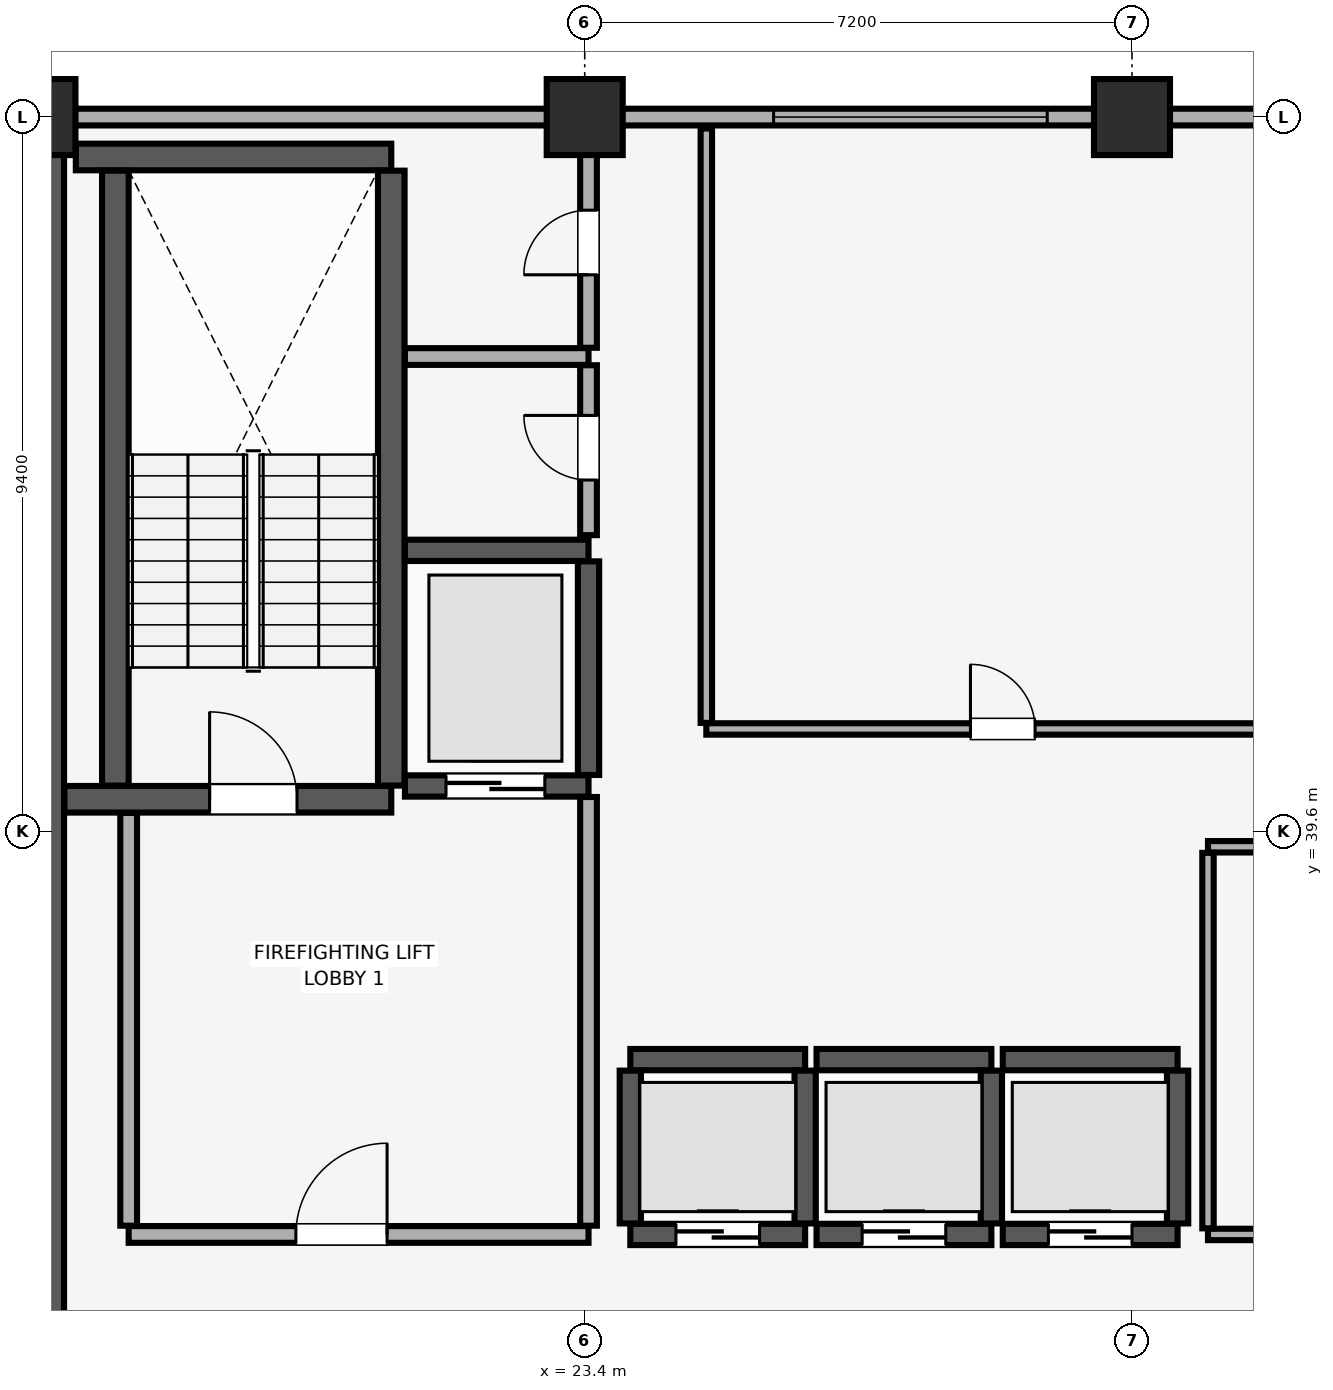
"""IFC4 building model, lengths in metres.
Left out: names, types, materials, properties, quantities, classifications, styles, units other than length and angle.
Written with IfcOpenShell. Run it as: python <this file> out.ifc"""

import sys

from ifc_helpers import new_model, si_unit, direction, frame, frame_2d, origin, origin_2d, place, context, subcontext, project, spatial, rectangle, extrude, element, fill, save


model = new_model("IFC4")
c1 = context("Model", 3, precision=1e-05, world=origin(), true_north=direction((0.0, 1.0)))
c2 = subcontext(c1, "Body", "Model", "MODEL_VIEW")
j1 = project(units=[si_unit("LENGTHUNIT", "METRE"), si_unit("PLANEANGLEUNIT", "RADIAN")], contexts=[c1])
p1 = place(None, origin())
s1 = spatial("IfcSite", under=j1, at=p1, CompositionType="ELEMENT")
p2 = place(p1, origin())
s2 = spatial("IfcBuilding", under=s1, at=p2, CompositionType="ELEMENT")
p3 = place(p2, frame((0.0, 0.0, 229.15)))
s3 = spatial("IfcBuildingStorey", under=s2, at=p3, CompositionType="ELEMENT", Elevation=229.15)
for number, where, z_axis, x_axis in (
    (1, (16.2, 49.0, 0.0), (0.0, 0.0, 1.0), (1.0, 0.0, 0.0)),
    (2, (23.4, 49.0, 0.0), (0.0, 0.0, 1.0), (1.0, 0.0, 0.0)),
    (3, (30.6, 49.0, 0.0), (0.0, 0.0, 1.0), (1.0, 0.0, 0.0)),
):
    element("IfcColumn", number, at=place(p3, frame(where, z_axis=z_axis, x_axis=x_axis)), inside=s3, PredefinedType="COLUMN", context=c2, shape_type="SweptSolid", body=[
        extrude(rectangle(XDim=1.0, YDim=1.0, at=origin_2d()), origin(), (0.0, 0.0, 1.0), 3.71),
    ])
p4 = place(p3, frame((74.2, 49.0, 0.0), z_axis=(0.0, 0.0, 1.0), x_axis=(-1.0, 0.0, 0.0)))
e4 = element("IfcWall", 4, at=p4, inside=s3, PredefinedType="SOLIDWALL", context=c2, shape_type="SweptSolid", body=[
    extrude(rectangle(XDim=64.4, YDim=0.22, at=frame_2d((32.2, 0.0))), origin(), (0.0, 0.0, 1.0), 2.91),
])
p5 = place(p4, frame((59.815, 0.0, 0.85)))
e5 = element("IfcOpeningElement", 5, at=p5, cuts=e4, PredefinedType="OPENING", context=c2, shape_type="SweptSolid", body=[
    extrude(rectangle(XDim=3.0, YDim=1.5, at=frame_2d((1.5, 0.75))), frame((0.0, 0.12, 0.0), z_axis=(0.0, -1.0, 0.0), x_axis=(1.0, 0.0, 0.0)), (0.0, 0.0, 1.0), 0.24),
])
p6 = place(p4, frame((1.585, 0.0, 0.85)))
e6 = element("IfcOpeningElement", 6, at=p6, cuts=e4, PredefinedType="OPENING", context=c2, shape_type="SweptSolid", body=[
    extrude(rectangle(XDim=3.0, YDim=1.5, at=frame_2d((1.5, 0.75))), frame((0.0, 0.12, 0.0), z_axis=(0.0, -1.0, 0.0), x_axis=(1.0, 0.0, 0.0)), (0.0, 0.0, 1.0), 0.24),
])
p7 = place(p4, frame((44.715, 0.0, 0.9)))
e7 = element("IfcOpeningElement", 7, at=p7, cuts=e4, PredefinedType="OPENING", context=c2, shape_type="SweptSolid", body=[
    extrude(rectangle(XDim=3.6, YDim=1.5, at=frame_2d((1.8, 0.75))), frame((0.0, 0.12, 0.0), z_axis=(0.0, -1.0, 0.0), x_axis=(1.0, 0.0, 0.0)), (0.0, 0.0, 1.0), 0.24),
])
p8 = place(p4, frame((38.5, 0.0, 0.9)))
e8 = element("IfcOpeningElement", 8, at=p8, cuts=e4, PredefinedType="OPENING", context=c2, shape_type="SweptSolid", body=[
    extrude(rectangle(XDim=2.4, YDim=1.5, at=frame_2d((1.2, 0.75))), frame((0.0, 0.12, 0.0), z_axis=(0.0, -1.0, 0.0), x_axis=(1.0, 0.0, 0.0)), (0.0, 0.0, 1.0), 0.24),
])
p9 = place(p4, frame((21.75, 0.0, 0.9)))
e9 = element("IfcOpeningElement", 9, at=p9, cuts=e4, PredefinedType="OPENING", context=c2, shape_type="SweptSolid", body=[
    extrude(rectangle(XDim=3.0, YDim=1.5, at=frame_2d((1.5, 0.75))), frame((0.0, 0.12, 0.0), z_axis=(0.0, -1.0, 0.0), x_axis=(1.0, 0.0, 0.0)), (0.0, 0.0, 1.0), 0.24),
])
p10 = place(p4, frame((17.435, 0.0, 0.9)))
e10 = element("IfcOpeningElement", 10, at=p10, cuts=e4, PredefinedType="OPENING", context=c2, shape_type="SweptSolid", body=[
    extrude(rectangle(XDim=2.4, YDim=1.5, at=frame_2d((1.2, 0.75))), frame((0.0, 0.12, 0.0), z_axis=(0.0, -1.0, 0.0), x_axis=(1.0, 0.0, 0.0)), (0.0, 0.0, 1.0), 0.24),
])
p11 = place(p3, frame((16.2, 29.4, 0.0), z_axis=(0.0, 0.0, 1.0), x_axis=(0.0, 1.0, 0.0)))
e11 = element("IfcWall", 11, at=p11, inside=s3, PredefinedType="SHEAR", context=c2, shape_type="SweptSolid", body=[
    extrude(rectangle(XDim=19.2, YDim=0.7, at=frame_2d((9.6, 0.0))), origin(), (0.0, 0.0, 1.0), 3.71),
])
p12 = place(p3, frame((16.555, 40.025, 0.0), z_axis=(0.0, 0.0, 1.0), x_axis=(1.0, 0.0, 0.0)))
e12 = element("IfcWall", 12, at=p12, inside=s3, PredefinedType="SHEAR", context=c2, shape_type="SweptSolid", body=[
    extrude(rectangle(XDim=4.3, YDim=0.35, at=frame_2d((2.15, 0.0))), origin(), (0.0, 0.0, 1.0), 3.71),
])
p13 = place(p12, frame((1.91, 0.0, 0.0)))
e13 = element("IfcOpeningElement", 13, at=p13, cuts=e12, PredefinedType="OPENING", context=c2, shape_type="SweptSolid", body=[
    extrude(rectangle(XDim=1.15, YDim=2.15, at=frame_2d((0.575, 1.075))), frame((0.0, 0.185, 0.0), z_axis=(0.0, -1.0, 0.0), x_axis=(1.0, 0.0, 0.0)), (0.0, 0.0, 1.0), 0.37),
])
p14 = place(p3, frame((16.705, 48.475, 0.0), z_axis=(0.0, 0.0, 1.0), x_axis=(1.0, 0.0, 0.0)))
e14 = element("IfcWall", 14, at=p14, inside=s3, PredefinedType="SHEAR", context=c2, shape_type="SweptSolid", body=[
    extrude(rectangle(XDim=4.15, YDim=0.35, at=frame_2d((2.075, 0.0))), origin(), (0.0, 0.0, 1.0), 3.71),
])
for number, where, z_axis, x_axis in (
    (15, (17.225, 40.205, 0.0), (0.0, 0.0, 1.0), (0.0, 1.0, 0.0)),
    (16, (20.855, 40.205, 0.0), (0.0, 0.0, 1.0), (0.0, 1.0, 0.0)),
):
    element("IfcWall", number, at=place(p3, frame(where, z_axis=z_axis, x_axis=x_axis)), inside=s3, PredefinedType="SHEAR", context=c2, shape_type="SweptSolid", body=[
        extrude(rectangle(XDim=8.09, YDim=0.35, at=frame_2d((4.045, 0.0))), origin(), (0.0, 0.0, 1.0), 3.71),
    ])
p15 = place(p3, frame((24.0, 34.3, 0.0), z_axis=(0.0, 0.0, 1.0), x_axis=(1.0, 0.0, 0.0)))
e17 = element("IfcWall", 17, at=p15, inside=s3, PredefinedType="SHEAR", context=c2, shape_type="SweptSolid", body=[
    extrude(rectangle(XDim=2.3, YDim=0.28, at=frame_2d((1.15, 0.0))), origin(), (0.0, 0.0, 1.0), 3.71),
])
p16 = place(p15, frame((0.6, 0.0, 0.0)))
e18 = element("IfcOpeningElement", 18, at=p16, cuts=e17, PredefinedType="OPENING", context=c2, shape_type="SweptSolid", body=[
    extrude(rectangle(XDim=1.1, YDim=2.2, at=frame_2d((0.55, 1.1))), frame((0.0, 0.15, 0.0), z_axis=(0.0, -1.0, 0.0), x_axis=(1.0, 0.0, 0.0)), (0.0, 0.0, 1.0), 0.3),
])
p17 = place(p3, frame((24.0, 36.6, 0.0), z_axis=(0.0, 0.0, 1.0), x_axis=(1.0, 0.0, 0.0)))
e19 = element("IfcWall", 19, at=p17, inside=s3, PredefinedType="SHEAR", context=c2, shape_type="SweptSolid", body=[
    extrude(rectangle(XDim=2.3, YDim=0.28, at=frame_2d((1.15, 0.0))), origin(), (0.0, 0.0, 1.0), 3.71),
])
for number, where, z_axis, x_axis in (
    (20, (24.0, 34.445, 0.0), (0.0, 0.0, 1.0), (0.0, 1.0, 0.0)),
    (21, (26.3, 34.445, 0.0), (0.0, 0.0, 1.0), (0.0, 1.0, 0.0)),
):
    element("IfcWall", number, at=place(p3, frame(where, z_axis=z_axis, x_axis=x_axis)), inside=s3, PredefinedType="SHEAR", context=c2, shape_type="SweptSolid", body=[
        extrude(rectangle(XDim=2.01, YDim=0.28, at=frame_2d((1.005, 0.0))), origin(), (0.0, 0.0, 1.0), 3.71),
    ])
p18 = place(p3, frame((26.45, 34.3, 0.0), z_axis=(0.0, 0.0, 1.0), x_axis=(1.0, 0.0, 0.0)))
e22 = element("IfcWall", 22, at=p18, inside=s3, PredefinedType="SHEAR", context=c2, shape_type="SweptSolid", body=[
    extrude(rectangle(XDim=2.3, YDim=0.28, at=frame_2d((1.15, 0.0))), origin(), (0.0, 0.0, 1.0), 3.71),
])
p19 = place(p18, frame((0.6, 0.0, 0.0)))
e23 = element("IfcOpeningElement", 23, at=p19, cuts=e22, PredefinedType="OPENING", context=c2, shape_type="SweptSolid", body=[
    extrude(rectangle(XDim=1.1, YDim=2.2, at=frame_2d((0.55, 1.1))), frame((0.0, 0.15, 0.0), z_axis=(0.0, -1.0, 0.0), x_axis=(1.0, 0.0, 0.0)), (0.0, 0.0, 1.0), 0.3),
])
p20 = place(p3, frame((26.45, 36.6, 0.0), z_axis=(0.0, 0.0, 1.0), x_axis=(1.0, 0.0, 0.0)))
e24 = element("IfcWall", 24, at=p20, inside=s3, PredefinedType="SHEAR", context=c2, shape_type="SweptSolid", body=[
    extrude(rectangle(XDim=2.3, YDim=0.28, at=frame_2d((1.15, 0.0))), origin(), (0.0, 0.0, 1.0), 3.71),
])
p21 = place(p3, frame((28.75, 34.445, 0.0), z_axis=(0.0, 0.0, 1.0), x_axis=(0.0, 1.0, 0.0)))
e25 = element("IfcWall", 25, at=p21, inside=s3, PredefinedType="SHEAR", context=c2, shape_type="SweptSolid", body=[
    extrude(rectangle(XDim=2.01, YDim=0.28, at=frame_2d((1.005, 0.0))), origin(), (0.0, 0.0, 1.0), 3.71),
])
p22 = place(p3, frame((28.9, 34.3, 0.0), z_axis=(0.0, 0.0, 1.0), x_axis=(1.0, 0.0, 0.0)))
e26 = element("IfcWall", 26, at=p22, inside=s3, PredefinedType="SHEAR", context=c2, shape_type="SweptSolid", body=[
    extrude(rectangle(XDim=2.3, YDim=0.28, at=frame_2d((1.15, 0.0))), origin(), (0.0, 0.0, 1.0), 3.71),
])
p23 = place(p22, frame((0.6, 0.0, 0.0)))
e27 = element("IfcOpeningElement", 27, at=p23, cuts=e26, PredefinedType="OPENING", context=c2, shape_type="SweptSolid", body=[
    extrude(rectangle(XDim=1.1, YDim=2.2, at=frame_2d((0.55, 1.1))), frame((0.0, 0.15, 0.0), z_axis=(0.0, -1.0, 0.0), x_axis=(1.0, 0.0, 0.0)), (0.0, 0.0, 1.0), 0.3),
])
p24 = place(p3, frame((28.9, 36.6, 0.0), z_axis=(0.0, 0.0, 1.0), x_axis=(1.0, 0.0, 0.0)))
e28 = element("IfcWall", 28, at=p24, inside=s3, PredefinedType="SHEAR", context=c2, shape_type="SweptSolid", body=[
    extrude(rectangle(XDim=2.3, YDim=0.28, at=frame_2d((1.15, 0.0))), origin(), (0.0, 0.0, 1.0), 3.71),
])
p25 = place(p3, frame((31.2, 34.445, 0.0), z_axis=(0.0, 0.0, 1.0), x_axis=(0.0, 1.0, 0.0)))
e29 = element("IfcWall", 29, at=p25, inside=s3, PredefinedType="SHEAR", context=c2, shape_type="SweptSolid", body=[
    extrude(rectangle(XDim=2.01, YDim=0.28, at=frame_2d((1.005, 0.0))), origin(), (0.0, 0.0, 1.0), 3.71),
])
p26 = place(p3, frame((21.035, 40.2, 0.0), z_axis=(0.0, 0.0, 1.0), x_axis=(1.0, 0.0, 0.0)))
e30 = element("IfcWall", 30, at=p26, inside=s3, PredefinedType="SHEAR", context=c2, shape_type="SweptSolid", body=[
    extrude(rectangle(XDim=2.415, YDim=0.28, at=frame_2d((1.208, 0.0))), origin(), (0.0, 0.0, 1.0), 3.71),
])
p27 = place(p26, frame((0.54, 0.0, 0.0)))
e31 = element("IfcOpeningElement", 31, at=p27, cuts=e30, PredefinedType="OPENING", context=c2, shape_type="SweptSolid", body=[
    extrude(rectangle(XDim=1.3, YDim=2.3, at=frame_2d((0.65, 1.15))), frame((0.0, 0.15, 0.0), z_axis=(0.0, -1.0, 0.0), x_axis=(1.0, 0.0, 0.0)), (0.0, 0.0, 1.0), 0.3),
])
p28 = place(p3, frame((21.035, 43.3, 0.0), z_axis=(0.0, 0.0, 1.0), x_axis=(1.0, 0.0, 0.0)))
e32 = element("IfcWall", 32, at=p28, inside=s3, PredefinedType="SHEAR", context=c2, shape_type="SweptSolid", body=[
    extrude(rectangle(XDim=2.415, YDim=0.28, at=frame_2d((1.208, 0.0))), origin(), (0.0, 0.0, 1.0), 3.71),
])
p29 = place(p3, frame((23.45, 40.345, 0.0), z_axis=(0.0, 0.0, 1.0), x_axis=(0.0, 1.0, 0.0)))
e33 = element("IfcWall", 33, at=p29, inside=s3, PredefinedType="SHEAR", context=c2, shape_type="SweptSolid", body=[
    extrude(rectangle(XDim=2.81, YDim=0.28, at=frame_2d((1.405, 0.0))), origin(), (0.0, 0.0, 1.0), 3.71),
])
p30 = place(p3, frame((17.4, 34.3, 0.0), z_axis=(0.0, 0.0, 1.0), x_axis=(1.0, 0.0, 0.0)))
e34 = element("IfcWall", 34, at=p30, inside=s3, PredefinedType="PARTITIONING", context=c2, shape_type="SweptSolid", body=[
    extrude(rectangle(XDim=6.05, YDim=0.22, at=frame_2d((3.025, 0.0))), origin(), (0.0, 0.0, 1.0), 3.71),
])
p31 = place(p30, frame((2.2, 0.0, 0.0)))
e35 = element("IfcOpeningElement", 35, at=p31, cuts=e34, PredefinedType="OPENING", context=c2, shape_type="SweptSolid", body=[
    extrude(rectangle(XDim=1.2, YDim=2.15, at=frame_2d((0.6, 1.075))), frame((0.0, 0.12, 0.0), z_axis=(0.0, -1.0, 0.0), x_axis=(1.0, 0.0, 0.0)), (0.0, 0.0, 1.0), 0.24),
])
p32 = place(p3, frame((17.4, 34.415, 0.0), z_axis=(0.0, 0.0, 1.0), x_axis=(0.0, 1.0, 0.0)))
e36 = element("IfcWall", 36, at=p32, inside=s3, PredefinedType="PARTITIONING", context=c2, shape_type="SweptSolid", body=[
    extrude(rectangle(XDim=5.43, YDim=0.22, at=frame_2d((2.715, 0.0))), origin(), (0.0, 0.0, 1.0), 3.71),
])
p33 = place(p3, frame((23.45, 34.415, 0.0), z_axis=(0.0, 0.0, 1.0), x_axis=(0.0, 1.0, 0.0)))
e37 = element("IfcWall", 37, at=p33, inside=s3, PredefinedType="PARTITIONING", context=c2, shape_type="SweptSolid", body=[
    extrude(rectangle(XDim=5.64, YDim=0.22, at=frame_2d((2.82, 0.0))), origin(), (0.0, 0.0, 1.0), 3.71),
])
p34 = place(p3, frame((21.035, 45.85, 0.0), z_axis=(0.0, 0.0, 1.0), x_axis=(1.0, 0.0, 0.0)))
e38 = element("IfcWall", 38, at=p34, inside=s3, PredefinedType="PARTITIONING", context=c2, shape_type="SweptSolid", body=[
    extrude(rectangle(XDim=2.415, YDim=0.22, at=frame_2d((1.208, 0.0))), origin(), (0.0, 0.0, 1.0), 3.71),
])
p35 = place(p3, frame((23.45, 43.5, 0.0), z_axis=(0.0, 0.0, 1.0), x_axis=(0.0, 1.0, 0.0)))
e39 = element("IfcWall", 39, at=p35, inside=s3, PredefinedType="PARTITIONING", context=c2, shape_type="SweptSolid", body=[
    extrude(rectangle(XDim=2.235, YDim=0.22, at=frame_2d((1.118, 0.0))), origin(), (0.0, 0.0, 1.0), 3.71),
])
p36 = place(p35, frame((0.725, 0.0, 0.0)))
e40 = element("IfcOpeningElement", 40, at=p36, cuts=e39, PredefinedType="OPENING", context=c2, shape_type="SweptSolid", body=[
    extrude(rectangle(XDim=0.85, YDim=2.1, at=frame_2d((0.425, 1.05))), frame((0.0, 0.12, 0.0), z_axis=(0.0, -1.0, 0.0), x_axis=(1.0, 0.0, 0.0)), (0.0, 0.0, 1.0), 0.24),
])
p37 = place(p3, frame((23.45, 45.965, 0.0), z_axis=(0.0, 0.0, 1.0), x_axis=(0.0, 1.0, 0.0)))
e41 = element("IfcWall", 41, at=p37, inside=s3, PredefinedType="PARTITIONING", context=c2, shape_type="SweptSolid", body=[
    extrude(rectangle(XDim=2.885, YDim=0.22, at=frame_2d((1.442, 0.0))), origin(), (0.0, 0.0, 1.0), 3.71),
])
p38 = place(p37, frame((0.96, 0.0, 0.0)))
e42 = element("IfcOpeningElement", 42, at=p38, cuts=e41, PredefinedType="OPENING", context=c2, shape_type="SweptSolid", body=[
    extrude(rectangle(XDim=0.85, YDim=2.1, at=frame_2d((0.425, 1.05))), frame((0.0, 0.12, 0.0), z_axis=(0.0, -1.0, 0.0), x_axis=(1.0, 0.0, 0.0)), (0.0, 0.0, 1.0), 0.24),
])
p39 = place(p3, frame((31.6, 34.3, 0.0), z_axis=(0.0, 0.0, 1.0), x_axis=(1.0, 0.0, 0.0)))
e43 = element("IfcWall", 43, at=p39, inside=s3, PredefinedType="PARTITIONING", context=c2, shape_type="SweptSolid", body=[
    extrude(rectangle(XDim=5.2, YDim=0.15, at=frame_2d((2.6, 0.0))), origin(), (0.0, 0.0, 1.0), 3.71),
])
p40 = place(p39, frame((2.175, 0.0, 0.0)))
e44 = element("IfcOpeningElement", 44, at=p40, cuts=e43, PredefinedType="OPENING", context=c2, shape_type="SweptSolid", body=[
    extrude(rectangle(XDim=0.85, YDim=2.1, at=frame_2d((0.425, 1.05))), frame((0.0, 0.085, 0.0), z_axis=(0.0, -1.0, 0.0), x_axis=(1.0, 0.0, 0.0)), (0.0, 0.0, 1.0), 0.17),
])
p41 = place(p3, frame((31.6, 39.4, 0.0), z_axis=(0.0, 0.0, 1.0), x_axis=(1.0, 0.0, 0.0)))
e45 = element("IfcWall", 45, at=p41, inside=s3, PredefinedType="PARTITIONING", context=c2, shape_type="SweptSolid", body=[
    extrude(rectangle(XDim=5.2, YDim=0.15, at=frame_2d((2.6, 0.0))), origin(), (0.0, 0.0, 1.0), 3.71),
])
p42 = place(p3, frame((31.6, 34.38, 0.0), z_axis=(0.0, 0.0, 1.0), x_axis=(0.0, 1.0, 0.0)))
e46 = element("IfcWall", 46, at=p42, inside=s3, PredefinedType="PARTITIONING", context=c2, shape_type="SweptSolid", body=[
    extrude(rectangle(XDim=4.94, YDim=0.15, at=frame_2d((2.47, 0.0))), origin(), (0.0, 0.0, 1.0), 3.71),
])
p43 = place(p3, frame((25.0, 40.95, 0.0), z_axis=(0.0, 0.0, 1.0), x_axis=(1.0, 0.0, 0.0)))
e47 = element("IfcWall", 47, at=p43, inside=s3, PredefinedType="PARTITIONING", context=c2, shape_type="SweptSolid", body=[
    extrude(rectangle(XDim=7.8, YDim=0.15, at=frame_2d((3.9, 0.0))), origin(), (0.0, 0.0, 1.0), 3.71),
])
p44 = place(p43, frame((3.475, 0.0, 0.0)))
e48 = element("IfcOpeningElement", 48, at=p44, cuts=e47, PredefinedType="OPENING", context=c2, shape_type="SweptSolid", body=[
    extrude(rectangle(XDim=0.85, YDim=2.1, at=frame_2d((0.425, 1.05))), frame((0.0, 0.085, 0.0), z_axis=(0.0, -1.0, 0.0), x_axis=(1.0, 0.0, 0.0)), (0.0, 0.0, 1.0), 0.17),
])
p45 = place(p3, frame((25.0, 41.03, 0.0), z_axis=(0.0, 0.0, 1.0), x_axis=(0.0, 1.0, 0.0)))
e49 = element("IfcWall", 49, at=p45, inside=s3, PredefinedType="PARTITIONING", context=c2, shape_type="SweptSolid", body=[
    extrude(rectangle(XDim=7.82, YDim=0.15, at=frame_2d((3.91, 0.0))), origin(), (0.0, 0.0, 1.0), 3.71),
])
p46 = place(p7, origin())
e50 = element("IfcWindow", 50, at=p46, inside=s3, PartitioningType="SINGLE_PANEL", PredefinedType="WINDOW", context=c2, shape_type="SweptSolid", body=[
    extrude(rectangle(XDim=3.6, YDim=1.5, at=frame_2d((1.8, 0.75))), frame((0.0, 0.03, 0.0), z_axis=(0.0, -1.0, 0.0), x_axis=(1.0, 0.0, 0.0)), (0.0, 0.0, 1.0), 0.06),
])
fill(e7, e50)
p47 = place(p13, origin())
e51 = element("IfcDoor", 51, at=p47, inside=s3, OperationType="SINGLE_SWING_LEFT", PredefinedType="DOOR", context=c2, shape_type="SweptSolid", body=[
    extrude(rectangle(XDim=1.15, YDim=2.15, at=frame_2d((0.575, 1.075))), frame((0.0, 0.025, 0.0), z_axis=(0.0, -1.0, 0.0), x_axis=(1.0, 0.0, 0.0)), (0.0, 0.0, 1.0), 0.05),
])
fill(e13, e51)
p48 = place(p16, origin())
e52 = element("IfcDoor", 52, at=p48, inside=s3, OperationType="DOUBLE_DOOR_SLIDING", PredefinedType="DOOR", context=c2, shape_type="SweptSolid", body=[
    extrude(rectangle(XDim=1.1, YDim=2.2, at=frame_2d((0.55, 1.1))), frame((0.0, 0.025, 0.0), z_axis=(0.0, -1.0, 0.0), x_axis=(1.0, 0.0, 0.0)), (0.0, 0.0, 1.0), 0.05),
])
fill(e18, e52)
p49 = place(p19, origin())
e53 = element("IfcDoor", 53, at=p49, inside=s3, OperationType="DOUBLE_DOOR_SLIDING", PredefinedType="DOOR", context=c2, shape_type="SweptSolid", body=[
    extrude(rectangle(XDim=1.1, YDim=2.2, at=frame_2d((0.55, 1.1))), frame((0.0, 0.025, 0.0), z_axis=(0.0, -1.0, 0.0), x_axis=(1.0, 0.0, 0.0)), (0.0, 0.0, 1.0), 0.05),
])
fill(e23, e53)
p50 = place(p23, origin())
e54 = element("IfcDoor", 54, at=p50, inside=s3, OperationType="DOUBLE_DOOR_SLIDING", PredefinedType="DOOR", context=c2, shape_type="SweptSolid", body=[
    extrude(rectangle(XDim=1.1, YDim=2.2, at=frame_2d((0.55, 1.1))), frame((0.0, 0.025, 0.0), z_axis=(0.0, -1.0, 0.0), x_axis=(1.0, 0.0, 0.0)), (0.0, 0.0, 1.0), 0.05),
])
fill(e27, e54)
p51 = place(p27, origin())
e55 = element("IfcDoor", 55, at=p51, inside=s3, OperationType="DOUBLE_DOOR_SLIDING", PredefinedType="DOOR", context=c2, shape_type="SweptSolid", body=[
    extrude(rectangle(XDim=1.3, YDim=2.3, at=frame_2d((0.65, 1.15))), frame((0.0, 0.025, 0.0), z_axis=(0.0, -1.0, 0.0), x_axis=(1.0, 0.0, 0.0)), (0.0, 0.0, 1.0), 0.05),
])
fill(e31, e55)
p52 = place(p31, origin())
e56 = element("IfcDoor", 56, at=p52, inside=s3, OperationType="SINGLE_SWING_RIGHT", PredefinedType="DOOR", context=c2, shape_type="SweptSolid", body=[
    extrude(rectangle(XDim=1.2, YDim=2.15, at=frame_2d((0.6, 1.075))), frame((0.0, 0.025, 0.0), z_axis=(0.0, -1.0, 0.0), x_axis=(1.0, 0.0, 0.0)), (0.0, 0.0, 1.0), 0.05),
])
fill(e35, e56)
p53 = place(p36, origin())
e57 = element("IfcDoor", 57, at=p53, inside=s3, OperationType="SINGLE_SWING_RIGHT", PredefinedType="DOOR", context=c2, shape_type="SweptSolid", body=[
    extrude(rectangle(XDim=0.85, YDim=2.1, at=frame_2d((0.425, 1.05))), frame((0.0, 0.025, 0.0), z_axis=(0.0, -1.0, 0.0), x_axis=(1.0, 0.0, 0.0)), (0.0, 0.0, 1.0), 0.05),
])
fill(e40, e57)
p54 = place(p38, origin())
e58 = element("IfcDoor", 58, at=p54, inside=s3, OperationType="SINGLE_SWING_LEFT", PredefinedType="DOOR", context=c2, shape_type="SweptSolid", body=[
    extrude(rectangle(XDim=0.85, YDim=2.1, at=frame_2d((0.425, 1.05))), frame((0.0, 0.025, 0.0), z_axis=(0.0, -1.0, 0.0), x_axis=(1.0, 0.0, 0.0)), (0.0, 0.0, 1.0), 0.05),
])
fill(e42, e58)
p55 = place(p44, origin())
e59 = element("IfcDoor", 59, at=p55, inside=s3, OperationType="SINGLE_SWING_LEFT", PredefinedType="DOOR", context=c2, shape_type="SweptSolid", body=[
    extrude(rectangle(XDim=0.85, YDim=2.1, at=frame_2d((0.425, 1.05))), frame((0.0, 0.025, 0.0), z_axis=(0.0, -1.0, 0.0), x_axis=(1.0, 0.0, 0.0)), (0.0, 0.0, 1.0), 0.05),
])
fill(e48, e59)
save(model, sys.argv[1])
